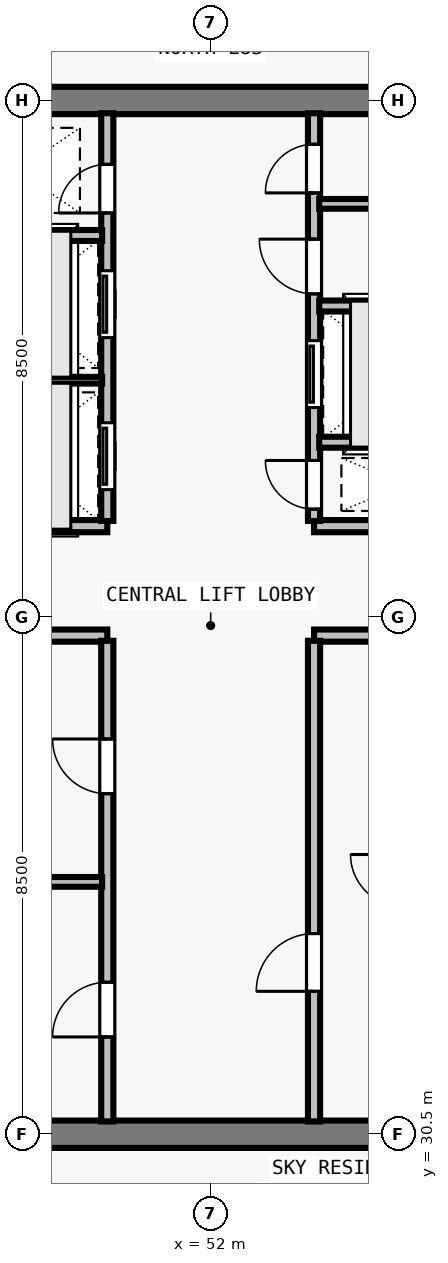
"""IFC4 building model, lengths in metres.
Left out: names, types, materials, properties, quantities, classifications, styles, units other than length and angle.
Written with IfcOpenShell. Run it as: python <this file> out.ifc"""

import sys

from ifc_helpers import new_model, si_unit, direction, frame, frame_2d, origin, place, context, subcontext, project, spatial, rectangle, extrude, element, fill, save


model = new_model("IFC4")
c1 = context("Model", 3, precision=1e-05, world=origin(), true_north=direction((0.0, 1.0)))
c2 = subcontext(c1, "Body", "Model", "MODEL_VIEW")
j1 = project(units=[si_unit("LENGTHUNIT", "METRE"), si_unit("PLANEANGLEUNIT", "RADIAN")], contexts=[c1])
p1 = place(None, origin())
s1 = spatial("IfcSite", under=j1, at=p1, CompositionType="ELEMENT")
p2 = place(p1, origin())
s2 = spatial("IfcBuilding", under=s1, at=p2, CompositionType="ELEMENT")
p3 = place(p2, frame((0.0, 0.0, 301.5)))
s3 = spatial("IfcBuildingStorey", under=s2, at=p3, CompositionType="ELEMENT", Elevation=301.5)
for number, where, z_axis, x_axis in (
    (1, (43.275, 30.5, 0.0), (0.0, 0.0, 1.0), (1.0, 0.0, 0.0)),
    (2, (43.275, 47.5, 0.0), (0.0, 0.0, 1.0), (1.0, 0.0, 0.0)),
):
    element("IfcWall", number, at=place(p3, frame(where, z_axis=z_axis, x_axis=x_axis)), inside=s3, PredefinedType="SHEAR", context=c2, shape_type="SweptSolid", body=[
        extrude(rectangle(XDim=17.45, YDim=0.45, at=frame_2d((8.725, 0.0))), origin(), (0.0, 0.0, 1.0), 3.29),
    ])
for number, where, z_axis, x_axis in (
    (3, (47.35, 38.7, 0.0), (0.0, 0.0, 1.0), (1.0, 0.0, 0.0)),
    (4, (47.35, 40.5, 0.0), (0.0, 0.0, 1.0), (1.0, 0.0, 0.0)),
    (5, (53.7, 38.7, 0.0), (0.0, 0.0, 1.0), (1.0, 0.0, 0.0)),
    (6, (53.7, 40.5, 0.0), (0.0, 0.0, 1.0), (1.0, 0.0, 0.0)),
):
    element("IfcWall", number, at=place(p3, frame(where, z_axis=z_axis, x_axis=x_axis)), inside=s3, PredefinedType="SOLIDWALL", context=c2, shape_type="SweptSolid", body=[
        extrude(rectangle(XDim=2.95, YDim=0.2, at=frame_2d((1.475, 0.0))), origin(), (0.0, 0.0, 1.0), 3.29),
    ])
p4 = place(p3, frame((50.3, 30.71, 0.0), z_axis=(0.0, 0.0, 1.0), x_axis=(0.0, 1.0, 0.0)))
e7 = element("IfcWall", 7, at=p4, inside=s3, PredefinedType="SOLIDWALL", context=c2, shape_type="SweptSolid", body=[
    extrude(rectangle(XDim=7.905, YDim=0.2, at=frame_2d((3.953, 0.0))), origin(), (0.0, 0.0, 1.0), 3.29),
])
p5 = place(p4, frame((1.39, 0.0, 0.0)))
e8 = element("IfcOpeningElement", 8, at=p5, cuts=e7, PredefinedType="OPENING", context=c2, shape_type="SweptSolid", body=[
    extrude(rectangle(XDim=0.9, YDim=2.12, at=frame_2d((0.45, 1.06))), frame((0.0, 0.11, 0.0), z_axis=(0.0, -1.0, 0.0), x_axis=(1.0, 0.0, 0.0)), (0.0, 0.0, 1.0), 0.22),
])
p6 = place(p4, frame((5.39, 0.0, 0.0)))
e9 = element("IfcOpeningElement", 9, at=p6, cuts=e7, PredefinedType="OPENING", context=c2, shape_type="SweptSolid", body=[
    extrude(rectangle(XDim=0.9, YDim=2.12, at=frame_2d((0.45, 1.06))), frame((0.0, 0.11, 0.0), z_axis=(0.0, -1.0, 0.0), x_axis=(1.0, 0.0, 0.0)), (0.0, 0.0, 1.0), 0.22),
])
p7 = place(p3, frame((53.7, 30.71, 0.0), z_axis=(0.0, 0.0, 1.0), x_axis=(0.0, 1.0, 0.0)))
e10 = element("IfcWall", 10, at=p7, inside=s3, PredefinedType="SOLIDWALL", context=c2, shape_type="SweptSolid", body=[
    extrude(rectangle(XDim=7.905, YDim=0.2, at=frame_2d((3.953, 0.0))), origin(), (0.0, 0.0, 1.0), 3.29),
])
p8 = place(p7, frame((2.14, 0.0, 0.0)))
e11 = element("IfcOpeningElement", 11, at=p8, cuts=e10, PredefinedType="OPENING", context=c2, shape_type="SweptSolid", body=[
    extrude(rectangle(XDim=0.95, YDim=2.12, at=frame_2d((0.475, 1.06))), frame((0.0, 0.11, 0.0), z_axis=(0.0, -1.0, 0.0), x_axis=(1.0, 0.0, 0.0)), (0.0, 0.0, 1.0), 0.22),
])
p9 = place(p3, frame((50.3, 40.585, 0.0), z_axis=(0.0, 0.0, 1.0), x_axis=(0.0, 1.0, 0.0)))
e12 = element("IfcWall", 12, at=p9, inside=s3, PredefinedType="SOLIDWALL", context=c2, shape_type="SweptSolid", body=[
    extrude(rectangle(XDim=6.705, YDim=0.2, at=frame_2d((3.353, 0.0))), origin(), (0.0, 0.0, 1.0), 3.29),
])
p10 = place(p9, frame((0.515, 0.0, 0.0)))
e13 = element("IfcOpeningElement", 13, at=p10, cuts=e12, PredefinedType="OPENING", context=c2, shape_type="SweptSolid", body=[
    extrude(rectangle(XDim=1.1, YDim=2.2, at=frame_2d((0.55, 1.1))), frame((0.0, 0.11, 0.0), z_axis=(0.0, -1.0, 0.0), x_axis=(1.0, 0.0, 0.0)), (0.0, 0.0, 1.0), 0.22),
])
p11 = place(p9, frame((3.015, 0.0, 0.0)))
e14 = element("IfcOpeningElement", 14, at=p11, cuts=e12, PredefinedType="OPENING", context=c2, shape_type="SweptSolid", body=[
    extrude(rectangle(XDim=1.1, YDim=2.2, at=frame_2d((0.55, 1.1))), frame((0.0, 0.11, 0.0), z_axis=(0.0, -1.0, 0.0), x_axis=(1.0, 0.0, 0.0)), (0.0, 0.0, 1.0), 0.22),
])
p12 = place(p9, frame((5.065, 0.0, 0.0)))
e15 = element("IfcOpeningElement", 15, at=p12, cuts=e12, PredefinedType="OPENING", context=c2, shape_type="SweptSolid", body=[
    extrude(rectangle(XDim=0.8, YDim=2.08, at=frame_2d((0.4, 1.04))), frame((0.0, 0.11, 0.0), z_axis=(0.0, -1.0, 0.0), x_axis=(1.0, 0.0, 0.0)), (0.0, 0.0, 1.0), 0.22),
])
p13 = place(p3, frame((53.7, 40.585, 0.0), z_axis=(0.0, 0.0, 1.0), x_axis=(0.0, 1.0, 0.0)))
e16 = element("IfcWall", 16, at=p13, inside=s3, PredefinedType="SOLIDWALL", context=c2, shape_type="SweptSolid", body=[
    extrude(rectangle(XDim=6.705, YDim=0.2, at=frame_2d((3.353, 0.0))), origin(), (0.0, 0.0, 1.0), 3.29),
])
p14 = place(p13, frame((0.195, 0.0, 0.0)))
e17 = element("IfcOpeningElement", 17, at=p14, cuts=e16, PredefinedType="OPENING", context=c2, shape_type="SweptSolid", body=[
    extrude(rectangle(XDim=0.8, YDim=2.08, at=frame_2d((0.4, 1.04))), frame((0.0, 0.11, 0.0), z_axis=(0.0, -1.0, 0.0), x_axis=(1.0, 0.0, 0.0)), (0.0, 0.0, 1.0), 0.22),
])
p15 = place(p13, frame((1.865, 0.0, 0.0)))
e18 = element("IfcOpeningElement", 18, at=p15, cuts=e16, PredefinedType="OPENING", context=c2, shape_type="SweptSolid", body=[
    extrude(rectangle(XDim=1.1, YDim=2.2, at=frame_2d((0.55, 1.1))), frame((0.0, 0.11, 0.0), z_axis=(0.0, -1.0, 0.0), x_axis=(1.0, 0.0, 0.0)), (0.0, 0.0, 1.0), 0.22),
])
p16 = place(p13, frame((3.735, 0.0, 0.0)))
e19 = element("IfcOpeningElement", 19, at=p16, cuts=e16, PredefinedType="OPENING", context=c2, shape_type="SweptSolid", body=[
    extrude(rectangle(XDim=0.9, YDim=2.12, at=frame_2d((0.45, 1.06))), frame((0.0, 0.11, 0.0), z_axis=(0.0, -1.0, 0.0), x_axis=(1.0, 0.0, 0.0)), (0.0, 0.0, 1.0), 0.22),
])
p17 = place(p13, frame((5.395, 0.0, 0.0)))
e20 = element("IfcOpeningElement", 20, at=p17, cuts=e16, PredefinedType="OPENING", context=c2, shape_type="SweptSolid", body=[
    extrude(rectangle(XDim=0.8, YDim=2.1, at=frame_2d((0.4, 1.05))), frame((0.0, 0.11, 0.0), z_axis=(0.0, -1.0, 0.0), x_axis=(1.0, 0.0, 0.0)), (0.0, 0.0, 1.0), 0.22),
])
p18 = place(p3, frame((47.415, 34.65, 0.0), z_axis=(0.0, 0.0, 1.0), x_axis=(1.0, 0.0, 0.0)))
e21 = element("IfcWall", 21, at=p18, inside=s3, PredefinedType="PARTITIONING", context=c2, shape_type="SweptSolid", body=[
    extrude(rectangle(XDim=2.8, YDim=0.16, at=frame_2d((1.4, 0.0))), origin(), (0.0, 0.0, 1.0), 3.29),
])
p19 = place(p3, frame((47.435, 42.9, 0.0), z_axis=(0.0, 0.0, 1.0), x_axis=(1.0, 0.0, 0.0)))
e22 = element("IfcWall", 22, at=p19, inside=s3, PredefinedType="PARTITIONING", context=c2, shape_type="SweptSolid", body=[
    extrude(rectangle(XDim=2.78, YDim=0.11, at=frame_2d((1.39, 0.0))), origin(), (0.0, 0.0, 1.0), 3.29),
])
p20 = place(p3, frame((47.425, 45.28, 0.0), z_axis=(0.0, 0.0, 1.0), x_axis=(1.0, 0.0, 0.0)))
e23 = element("IfcWall", 23, at=p20, inside=s3, PredefinedType="SOLIDWALL", context=c2, shape_type="SweptSolid", body=[
    extrude(rectangle(XDim=2.79, YDim=0.18, at=frame_2d((1.395, 0.0))), origin(), (0.0, 0.0, 1.0), 3.29),
])
p21 = place(p3, frame((53.785, 41.88, 0.0), z_axis=(0.0, 0.0, 1.0), x_axis=(1.0, 0.0, 0.0)))
e24 = element("IfcWall", 24, at=p21, inside=s3, PredefinedType="SOLIDWALL", context=c2, shape_type="SweptSolid", body=[
    extrude(rectangle(XDim=2.78, YDim=0.18, at=frame_2d((1.39, 0.0))), origin(), (0.0, 0.0, 1.0), 3.29),
])
p22 = place(p3, frame((53.785, 44.12, 0.0), z_axis=(0.0, 0.0, 1.0), x_axis=(1.0, 0.0, 0.0)))
e25 = element("IfcWall", 25, at=p22, inside=s3, PredefinedType="SOLIDWALL", context=c2, shape_type="SweptSolid", body=[
    extrude(rectangle(XDim=2.79, YDim=0.18, at=frame_2d((1.395, 0.0))), origin(), (0.0, 0.0, 1.0), 3.29),
])
p23 = place(p3, frame((53.785, 45.8, 0.0), z_axis=(0.0, 0.0, 1.0), x_axis=(1.0, 0.0, 0.0)))
e26 = element("IfcWall", 26, at=p23, inside=s3, PredefinedType="PARTITIONING", context=c2, shape_type="SweptSolid", body=[
    extrude(rectangle(XDim=2.79, YDim=0.16, at=frame_2d((1.395, 0.0))), origin(), (0.0, 0.0, 1.0), 3.29),
])
p24 = place(p5, origin())
e27 = element("IfcDoor", 27, at=p24, inside=s3, OperationType="SINGLE_SWING_LEFT", PredefinedType="DOOR", context=c2, shape_type="SweptSolid", body=[
    extrude(rectangle(XDim=0.9, YDim=2.12, at=frame_2d((0.45, 1.06))), frame((0.0, 0.025, 0.0), z_axis=(0.0, -1.0, 0.0), x_axis=(1.0, 0.0, 0.0)), (0.0, 0.0, 1.0), 0.05),
])
fill(e8, e27)
p25 = place(p6, origin())
e28 = element("IfcDoor", 28, at=p25, inside=s3, OperationType="SINGLE_SWING_RIGHT", PredefinedType="DOOR", context=c2, shape_type="SweptSolid", body=[
    extrude(rectangle(XDim=0.9, YDim=2.12, at=frame_2d((0.45, 1.06))), frame((0.0, 0.025, 0.0), z_axis=(0.0, -1.0, 0.0), x_axis=(1.0, 0.0, 0.0)), (0.0, 0.0, 1.0), 0.05),
])
fill(e9, e28)
p26 = place(p8, origin())
e29 = element("IfcDoor", 29, at=p26, inside=s3, OperationType="SINGLE_SWING_LEFT", PredefinedType="DOOR", context=c2, shape_type="SweptSolid", body=[
    extrude(rectangle(XDim=0.95, YDim=2.12, at=frame_2d((0.475, 1.06))), frame((0.0, 0.025, 0.0), z_axis=(0.0, -1.0, 0.0), x_axis=(1.0, 0.0, 0.0)), (0.0, 0.0, 1.0), 0.05),
])
fill(e11, e29)
p27 = place(p10, origin())
e30 = element("IfcDoor", 30, at=p27, inside=s3, OperationType="SLIDING_TO_LEFT", PredefinedType="DOOR", context=c2, shape_type="SweptSolid", body=[
    extrude(rectangle(XDim=1.1, YDim=2.2, at=frame_2d((0.55, 1.1))), frame((0.0, 0.025, 0.0), z_axis=(0.0, -1.0, 0.0), x_axis=(1.0, 0.0, 0.0)), (0.0, 0.0, 1.0), 0.05),
])
fill(e13, e30)
p28 = place(p11, origin())
e31 = element("IfcDoor", 31, at=p28, inside=s3, OperationType="SLIDING_TO_LEFT", PredefinedType="DOOR", context=c2, shape_type="SweptSolid", body=[
    extrude(rectangle(XDim=1.1, YDim=2.2, at=frame_2d((0.55, 1.1))), frame((0.0, 0.025, 0.0), z_axis=(0.0, -1.0, 0.0), x_axis=(1.0, 0.0, 0.0)), (0.0, 0.0, 1.0), 0.05),
])
fill(e14, e31)
p29 = place(p12, origin())
e32 = element("IfcDoor", 32, at=p29, inside=s3, OperationType="SINGLE_SWING_LEFT", PredefinedType="DOOR", context=c2, shape_type="SweptSolid", body=[
    extrude(rectangle(XDim=0.8, YDim=2.08, at=frame_2d((0.4, 1.04))), frame((0.0, 0.025, 0.0), z_axis=(0.0, -1.0, 0.0), x_axis=(1.0, 0.0, 0.0)), (0.0, 0.0, 1.0), 0.05),
])
fill(e15, e32)
p30 = place(p14, origin())
e33 = element("IfcDoor", 33, at=p30, inside=s3, OperationType="SINGLE_SWING_RIGHT", PredefinedType="DOOR", context=c2, shape_type="SweptSolid", body=[
    extrude(rectangle(XDim=0.8, YDim=2.08, at=frame_2d((0.4, 1.04))), frame((0.0, 0.025, 0.0), z_axis=(0.0, -1.0, 0.0), x_axis=(1.0, 0.0, 0.0)), (0.0, 0.0, 1.0), 0.05),
])
fill(e17, e33)
p31 = place(p15, origin())
e34 = element("IfcDoor", 34, at=p31, inside=s3, OperationType="SLIDING_TO_LEFT", PredefinedType="DOOR", context=c2, shape_type="SweptSolid", body=[
    extrude(rectangle(XDim=1.1, YDim=2.2, at=frame_2d((0.55, 1.1))), frame((0.0, 0.025, 0.0), z_axis=(0.0, -1.0, 0.0), x_axis=(1.0, 0.0, 0.0)), (0.0, 0.0, 1.0), 0.05),
])
fill(e18, e34)
p32 = place(p16, origin())
e35 = element("IfcDoor", 35, at=p32, inside=s3, OperationType="SINGLE_SWING_RIGHT", PredefinedType="DOOR", context=c2, shape_type="SweptSolid", body=[
    extrude(rectangle(XDim=0.9, YDim=2.12, at=frame_2d((0.45, 1.06))), frame((0.0, 0.025, 0.0), z_axis=(0.0, -1.0, 0.0), x_axis=(1.0, 0.0, 0.0)), (0.0, 0.0, 1.0), 0.05),
])
fill(e19, e35)
p33 = place(p17, origin())
e36 = element("IfcDoor", 36, at=p33, inside=s3, OperationType="SINGLE_SWING_LEFT", PredefinedType="DOOR", context=c2, shape_type="SweptSolid", body=[
    extrude(rectangle(XDim=0.8, YDim=2.1, at=frame_2d((0.4, 1.05))), frame((0.0, 0.025, 0.0), z_axis=(0.0, -1.0, 0.0), x_axis=(1.0, 0.0, 0.0)), (0.0, 0.0, 1.0), 0.05),
])
fill(e20, e36)
save(model, sys.argv[1])
